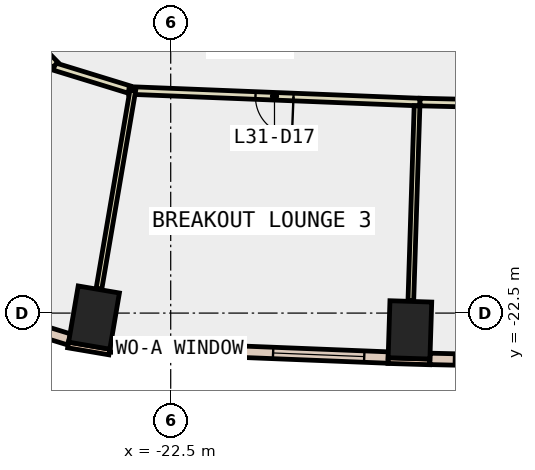
"""IFC4 building model, lengths in metres.
Left out: names, types, materials, properties, quantities, classifications, styles, units other than length and angle.
Written with IfcOpenShell. Run it as: python <this file> out.ifc"""

import sys

from ifc_helpers import new_model, si_unit, direction, frame, frame_2d, origin, origin_2d, place, context, subcontext, project, spatial, rectangle, extrude, element, fill, save


model = new_model("IFC4")
c1 = context("Model", 3, precision=1e-05, world=origin(), true_north=direction((0.0, 1.0)))
c2 = subcontext(c1, "Body", "Model", "MODEL_VIEW")
j1 = project(units=[si_unit("LENGTHUNIT", "METRE"), si_unit("PLANEANGLEUNIT", "RADIAN")], contexts=[c1])
p1 = place(None, origin())
s1 = spatial("IfcSite", under=j1, at=p1, CompositionType="ELEMENT")
p2 = place(p1, origin())
s2 = spatial("IfcBuilding", under=s1, at=p2, CompositionType="ELEMENT")
p3 = place(p2, frame((0.0, 0.0, 142.4)))
s3 = spatial("IfcBuildingStorey", under=s2, at=p3, CompositionType="ELEMENT", Elevation=142.4)
for number, where, z_axis, x_axis in (
    (1, (-24.518, -22.618, -0.4), (0.0, 0.0, 1.0), (-0.986, 0.168, 0.0)),
    (2, (-16.205, -22.942, -0.4), (0.0, 0.0, 1.0), (-0.999, 0.032, 0.0)),
):
    element("IfcColumn", number, at=place(p3, frame(where, z_axis=z_axis, x_axis=x_axis)), inside=s3, PredefinedType="COLUMN", context=c2, shape_type="SweptSolid", body=[
        extrude(rectangle(XDim=1.1, YDim=1.5, at=origin_2d()), origin(), (0.0, 0.0, 1.0), 4.2),
    ])
p4 = place(p3, frame((-25.199, -23.339, 0.0), z_axis=(0.0, 0.0, 1.0), x_axis=(0.985800082077, -0.167923191299, 0.0)))
e3 = element("IfcWall", 3, at=p4, inside=s3, PredefinedType="STANDARD", context=c2, shape_type="SweptSolid", body=[
    extrude(rectangle(XDim=1.101, YDim=0.15, at=frame_2d((0.55, 0.0))), origin(), (0.0, 0.0, 1.0), 3.8),
])
p5 = place(p3, frame((-16.781, -23.75, 0.0), z_axis=(0.0, 0.0, 1.0), x_axis=(0.999523702549, -0.030860460829, 0.0)))
e4 = element("IfcWall", 4, at=p5, inside=s3, PredefinedType="STANDARD", context=c2, shape_type="SweptSolid", body=[
    extrude(rectangle(XDim=1.1, YDim=0.15, at=frame_2d((0.55, 0.0))), origin(), (0.0, 0.0, 1.0), 3.8),
])
p6 = place(p3, frame((-24.09, -23.378, 0.0), z_axis=(0.0, 0.0, 1.0), x_axis=(0.999203621229, -0.039901420066, 0.0)))
e5 = element("IfcWall", 5, at=p6, inside=s3, PredefinedType="STANDARD", context=c2, shape_type="SweptSolid", body=[
    extrude(rectangle(XDim=7.318, YDim=0.3, at=frame_2d((3.659, 0.0))), origin(), (0.0, 0.0, 1.0), 3.8),
])
p7 = place(p6, frame((0.629, 0.0, 0.9)))
e6 = element("IfcOpeningElement", 6, at=p7, cuts=e5, PredefinedType="OPENING", context=c2, shape_type="SweptSolid", body=[
    extrude(rectangle(XDim=2.4, YDim=2.6, at=frame_2d((1.2, 1.3))), frame((0.0, 0.16, 0.0), z_axis=(0.0, -1.0, 0.0), x_axis=(1.0, 0.0, 0.0)), (0.0, 0.0, 1.0), 0.32),
])
p8 = place(p6, frame((4.288, 0.0, 0.9)))
e7 = element("IfcOpeningElement", 7, at=p8, cuts=e5, PredefinedType="OPENING", context=c2, shape_type="SweptSolid", body=[
    extrude(rectangle(XDim=2.4, YDim=2.6, at=frame_2d((1.2, 1.3))), frame((0.0, 0.16, 0.0), z_axis=(0.0, -1.0, 0.0), x_axis=(1.0, 0.0, 0.0)), (0.0, 0.0, 1.0), 0.32),
])
p9 = place(p3, frame((-15.68, -23.705, 0.0), z_axis=(0.0, 0.0, 1.0), x_axis=(0.999722302867, -0.023565168146, 0.0)))
e8 = element("IfcWall", 8, at=p9, inside=s3, PredefinedType="STANDARD", context=c2, shape_type="SweptSolid", body=[
    extrude(rectangle(XDim=7.335, YDim=0.3, at=frame_2d((3.667, 0.0))), origin(), (0.0, 0.0, 1.0), 3.8),
])
p10 = place(p9, frame((0.634, 0.0, 0.9)))
e9 = element("IfcOpeningElement", 9, at=p10, cuts=e8, PredefinedType="OPENING", context=c2, shape_type="SweptSolid", body=[
    extrude(rectangle(XDim=2.4, YDim=2.6, at=frame_2d((1.2, 1.3))), frame((0.0, 0.16, 0.0), z_axis=(0.0, -1.0, 0.0), x_axis=(1.0, 0.0, 0.0)), (0.0, 0.0, 1.0), 0.32),
])
p11 = place(p9, frame((4.301, 0.0, 0.9)))
e10 = element("IfcOpeningElement", 10, at=p11, cuts=e8, PredefinedType="OPENING", context=c2, shape_type="SweptSolid", body=[
    extrude(rectangle(XDim=2.4, YDim=2.6, at=frame_2d((1.2, 1.3))), frame((0.0, 0.16, 0.0), z_axis=(0.0, -1.0, 0.0), x_axis=(1.0, 0.0, 0.0)), (0.0, 0.0, 1.0), 0.32),
])
p12 = place(p3, frame((-28.554, -22.154, 0.0), z_axis=(0.0, 0.0, 1.0), x_axis=(0.955874475611, -0.293775402094, 0.0)))
e11 = element("IfcWall", 11, at=p12, inside=s3, PredefinedType="STANDARD", context=c2, shape_type="SweptSolid", body=[
    extrude(rectangle(XDim=3.537, YDim=0.3, at=frame_2d((1.769, 0.0))), origin(), (0.0, 0.0, 1.0), 3.8),
])
p13 = place(p12, frame((1.069, 0.0, 0.9)))
e12 = element("IfcOpeningElement", 12, at=p13, cuts=e11, PredefinedType="OPENING", context=c2, shape_type="SweptSolid", body=[
    extrude(rectangle(XDim=1.4, YDim=2.6, at=frame_2d((0.7, 1.3))), frame((0.0, 0.16, 0.0), z_axis=(0.0, -1.0, 0.0), x_axis=(1.0, 0.0, 0.0)), (0.0, 0.0, 1.0), 0.32),
])
p14 = place(p3, frame((-23.594, -16.617, 0.0), z_axis=(0.0, 0.0, 1.0), x_axis=(-0.955896815358, 0.293702704087, 0.0)))
e13 = element("IfcWall", 13, at=p14, inside=s3, PredefinedType="PARTITIONING", context=c2, shape_type="SweptSolid", body=[
    extrude(rectangle(XDim=2.06, YDim=0.2, at=frame_2d((1.03, 0.0))), origin(), (0.0, 0.0, 1.0), 3.8),
])
p15 = place(p3, frame((-25.538, -15.97, 0.0), z_axis=(0.0, 0.0, 1.0), x_axis=(-0.698272822523, 0.715831729756, 0.0)))
e14 = element("IfcWall", 14, at=p15, inside=s3, PredefinedType="PARTITIONING", context=c2, shape_type="SweptSolid", body=[
    extrude(rectangle(XDim=1.196, YDim=0.2, at=frame_2d((0.598, 0.0))), origin(), (0.0, 0.0, 1.0), 3.8),
])
p16 = place(p3, frame((-15.94, -16.948, 0.0), z_axis=(0.0, 0.0, 1.0), x_axis=(-0.999203094545, 0.03991460699, 0.0)))
e15 = element("IfcWall", 15, at=p16, inside=s3, PredefinedType="PARTITIONING", context=c2, shape_type="SweptSolid", body=[
    extrude(rectangle(XDim=7.664, YDim=0.2, at=frame_2d((3.832, 0.0))), origin(), (0.0, 0.0, 1.0), 3.8),
])
p17 = place(p16, frame((3.332, 0.0, 0.0)))
e16 = element("IfcOpeningElement", 16, at=p17, cuts=e15, PredefinedType="OPENING", context=c2, shape_type="SweptSolid", body=[
    extrude(rectangle(XDim=1.0, YDim=2.1, at=frame_2d((0.5, 1.05))), frame((0.0, 0.11, 0.0), z_axis=(0.0, -1.0, 0.0), x_axis=(1.0, 0.0, 0.0)), (0.0, 0.0, 1.0), 0.22),
])
p18 = place(p3, frame((-7.7, -17.141, 0.0), z_axis=(0.0, 0.0, 1.0), x_axis=(-0.999722699727, 0.023548325865, 0.0)))
e17 = element("IfcWall", 17, at=p18, inside=s3, PredefinedType="PARTITIONING", context=c2, shape_type="SweptSolid", body=[
    extrude(rectangle(XDim=8.242, YDim=0.2, at=frame_2d((4.121, 0.0))), origin(), (0.0, 0.0, 1.0), 3.8),
])
p19 = place(p18, frame((3.696, 0.0, 0.0)))
e18 = element("IfcOpeningElement", 18, at=p19, cuts=e17, PredefinedType="OPENING", context=c2, shape_type="SweptSolid", body=[
    extrude(rectangle(XDim=1.0, YDim=2.1, at=frame_2d((0.5, 1.05))), frame((0.0, 0.11, 0.0), z_axis=(0.0, -1.0, 0.0), x_axis=(1.0, 0.0, 0.0)), (0.0, 0.0, 1.0), 0.22),
])
p20 = place(p3, frame((-23.498, -16.646, 0.0), z_axis=(0.0, 0.0, 1.0), x_axis=(-0.168275674737, -0.985739974482, 0.0)))
e19 = element("IfcWall", 19, at=p20, inside=s3, PredefinedType="PARTITIONING", context=c2, shape_type="SweptSolid", body=[
    extrude(rectangle(XDim=5.288, YDim=0.15, at=frame_2d((2.644, 0.0))), origin(), (0.0, 0.0, 1.0), 3.8),
])
p21 = place(p3, frame((-16.018, -17.045, 0.0), z_axis=(0.0, 0.0, 1.0), x_axis=(-0.031744385759, -0.999496019988, 0.0)))
e20 = element("IfcWall", 20, at=p21, inside=s3, PredefinedType="PARTITIONING", context=c2, shape_type="SweptSolid", body=[
    extrude(rectangle(XDim=5.13, YDim=0.15, at=frame_2d((2.565, 0.0))), origin(), (0.0, 0.0, 1.0), 3.8),
])
p22 = place(p7, origin())
e21 = element("IfcWindow", 21, at=p22, inside=s3, PartitioningType="SINGLE_PANEL", PredefinedType="WINDOW", context=c2, shape_type="SweptSolid", body=[
    extrude(rectangle(XDim=2.4, YDim=2.6, at=frame_2d((1.2, 1.3))), frame((0.0, 0.03, 0.0), z_axis=(0.0, -1.0, 0.0), x_axis=(1.0, 0.0, 0.0)), (0.0, 0.0, 1.0), 0.06),
])
fill(e6, e21)
p23 = place(p8, origin())
e22 = element("IfcWindow", 22, at=p23, inside=s3, PartitioningType="SINGLE_PANEL", PredefinedType="WINDOW", context=c2, shape_type="SweptSolid", body=[
    extrude(rectangle(XDim=2.4, YDim=2.6, at=frame_2d((1.2, 1.3))), frame((0.0, 0.03, 0.0), z_axis=(0.0, -1.0, 0.0), x_axis=(1.0, 0.0, 0.0)), (0.0, 0.0, 1.0), 0.06),
])
fill(e7, e22)
p24 = place(p10, origin())
e23 = element("IfcWindow", 23, at=p24, inside=s3, PartitioningType="SINGLE_PANEL", PredefinedType="WINDOW", context=c2, shape_type="SweptSolid", body=[
    extrude(rectangle(XDim=2.4, YDim=2.6, at=frame_2d((1.2, 1.3))), frame((0.0, 0.03, 0.0), z_axis=(0.0, -1.0, 0.0), x_axis=(1.0, 0.0, 0.0)), (0.0, 0.0, 1.0), 0.06),
])
fill(e9, e23)
p25 = place(p17, origin())
e24 = element("IfcDoor", 24, at=p25, inside=s3, OperationType="SINGLE_SWING_LEFT", PredefinedType="DOOR", context=c2, shape_type="SweptSolid", body=[
    extrude(rectangle(XDim=1.0, YDim=2.1, at=frame_2d((0.5, 1.05))), frame((0.0, 0.025, 0.0), z_axis=(0.0, -1.0, 0.0), x_axis=(1.0, 0.0, 0.0)), (0.0, 0.0, 1.0), 0.05),
])
fill(e16, e24)
save(model, sys.argv[1])
